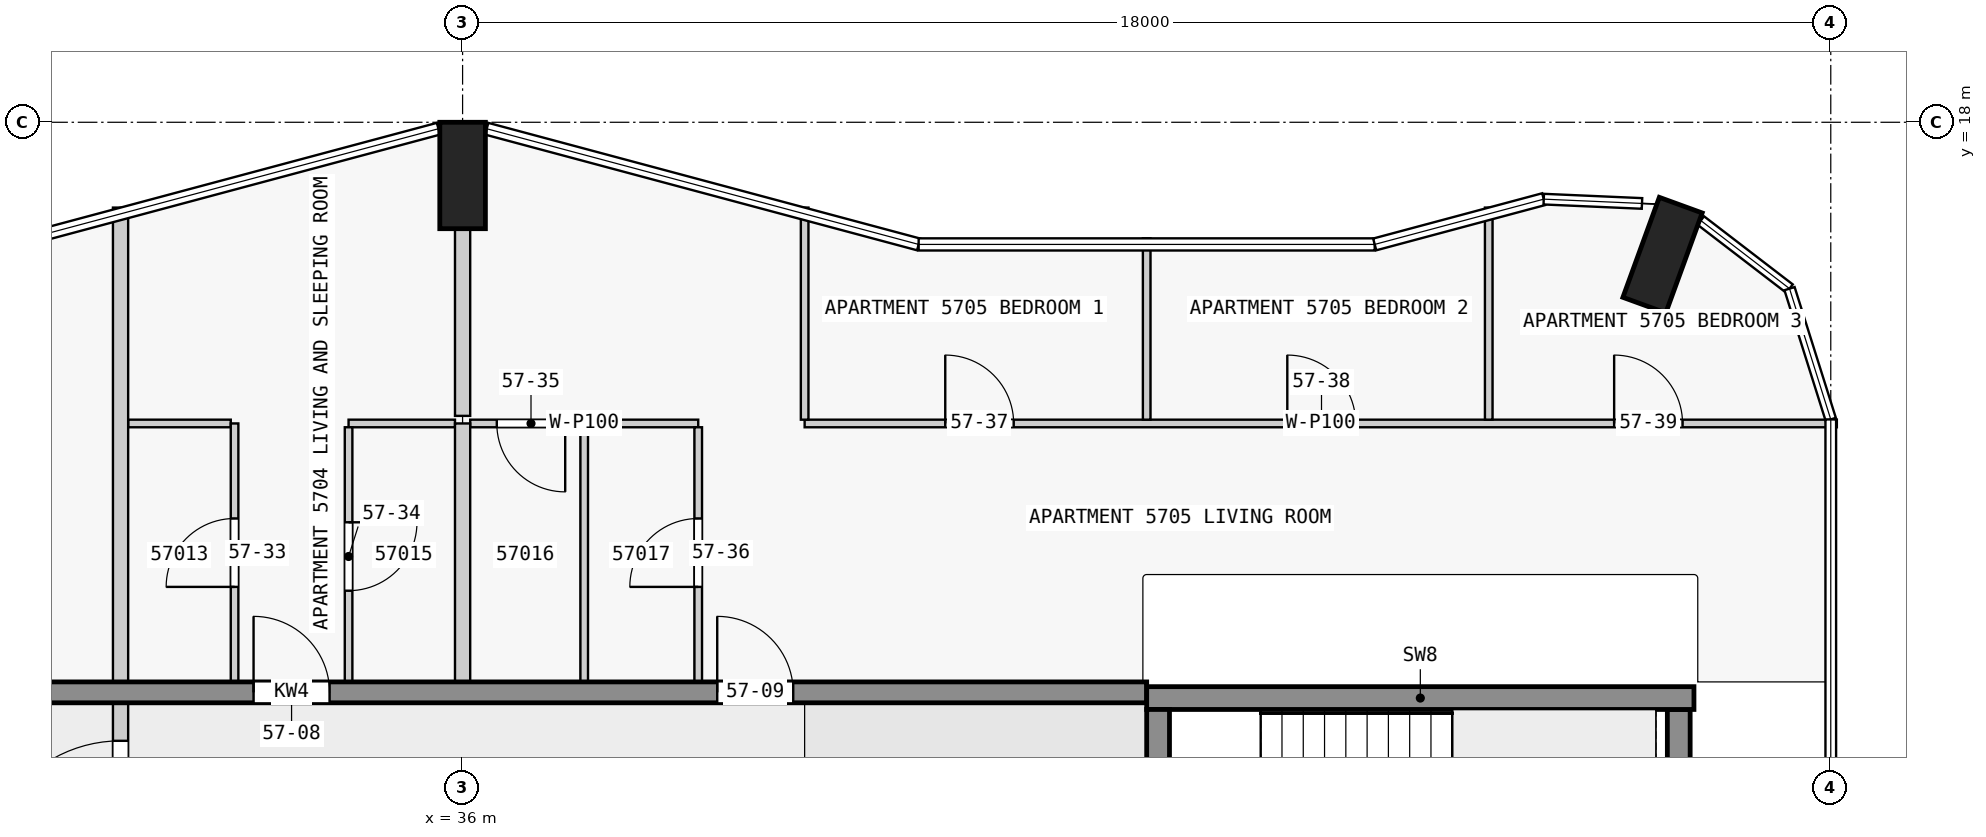
"""IFC4 building model, lengths in metres.
Left out: names, types, materials, properties, quantities, classifications, styles, units other than length and angle.
Written with IfcOpenShell. Run it as: python <this file> out.ifc"""

import sys

from ifc_helpers import new_model, si_unit, direction, frame, frame_2d, origin, origin_2d, place, context, subcontext, project, spatial, rectangle, extrude, element, fill, save


model = new_model("IFC4")
c1 = context("Model", 3, precision=1e-05, world=origin(), true_north=direction((0.0, 1.0)))
c2 = subcontext(c1, "Body", "Model", "MODEL_VIEW")
j1 = project(units=[si_unit("LENGTHUNIT", "METRE"), si_unit("PLANEANGLEUNIT", "RADIAN")], contexts=[c1])
p1 = place(None, origin())
s1 = spatial("IfcSite", under=j1, at=p1, CompositionType="ELEMENT")
p2 = place(p1, origin())
s2 = spatial("IfcBuilding", under=s1, at=p2, CompositionType="ELEMENT")
p3 = place(p2, frame((0.0, 0.0, 218.9)))
s3 = spatial("IfcBuildingStorey", under=s2, at=p3, CompositionType="ELEMENT", Elevation=218.9)
for number, where, z_axis, x_axis in (
    (1, (51.787, 16.252, 0.0), (0.0, 0.0, 1.0), (-0.94, 0.342, 0.0)),
    (2, (36.0, 17.3, 0.0), (0.0, 0.0, 1.0), (1.0, 0.0, 0.0)),
):
    element("IfcColumn", number, at=place(p3, frame(where, z_axis=z_axis, x_axis=x_axis)), inside=s3, PredefinedType="COLUMN", context=c2, shape_type="SweptSolid", body=[
        extrude(rectangle(XDim=0.6, YDim=1.4, at=origin_2d()), origin(), (0.0, 0.0, 1.0), 3.5),
    ])
p4 = place(p3, frame((45.15, 7.725, 0.0), z_axis=(0.0, 0.0, 1.0), x_axis=(0.0, 1.0, 0.0)))
e3 = element("IfcWall", 3, at=p4, inside=s3, PredefinedType="SHEAR", context=c2, shape_type="SweptSolid", body=[
    extrude(rectangle(XDim=2.55, YDim=0.3, at=frame_2d((1.275, 0.0))), origin(), (0.0, 0.0, 1.0), 3.5),
])
p5 = place(p4, frame((0.725, 0.0, 0.0)))
e4 = element("IfcOpeningElement", 4, at=p5, cuts=e3, PredefinedType="OPENING", context=c2, shape_type="SweptSolid", body=[
    extrude(rectangle(XDim=1.1, YDim=2.1, at=frame_2d((0.55, 1.05))), frame((0.0, 0.16, 0.0), z_axis=(0.0, -1.0, 0.0), x_axis=(1.0, 0.0, 0.0)), (0.0, 0.0, 1.0), 0.32),
])
p6 = place(p3, frame((52.0, 7.725, 0.0), z_axis=(0.0, 0.0, 1.0), x_axis=(0.0, 1.0, 0.0)))
e5 = element("IfcWall", 5, at=p6, inside=s3, PredefinedType="SHEAR", context=c2, shape_type="SweptSolid", body=[
    extrude(rectangle(XDim=2.55, YDim=0.3, at=frame_2d((1.275, 0.0))), origin(), (0.0, 0.0, 1.0), 3.5),
])
p7 = place(p3, frame((45.0, 10.425, 0.0), z_axis=(0.0, 0.0, 1.0), x_axis=(1.0, 0.0, 0.0)))
e6 = element("IfcWall", 6, at=p7, inside=s3, PredefinedType="SHEAR", context=c2, shape_type="SweptSolid", body=[
    extrude(rectangle(XDim=7.2, YDim=0.3, at=frame_2d((3.6, 0.0))), origin(), (0.0, 0.0, 1.0), 3.5),
])
p8 = place(p3, frame((22.5, 10.5, 0.0), z_axis=(0.0, 0.0, 1.0), x_axis=(1.0, 0.0, 0.0)))
e7 = element("IfcWall", 7, at=p8, inside=s3, PredefinedType="SHEAR", context=c2, shape_type="SweptSolid", body=[
    extrude(rectangle(XDim=22.5, YDim=0.275, at=frame_2d((11.25, 0.0))), origin(), (0.0, 0.0, 1.0), 3.25),
])
p9 = place(p8, frame((1.75, 0.0, 0.0)))
e8 = element("IfcOpeningElement", 8, at=p9, cuts=e7, PredefinedType="OPENING", context=c2, shape_type="SweptSolid", body=[
    extrude(rectangle(XDim=1.0, YDim=2.1, at=frame_2d((0.5, 1.05))), frame((0.0, 0.147, 0.0), z_axis=(0.0, -1.0, 0.0), x_axis=(1.0, 0.0, 0.0)), (0.0, 0.0, 1.0), 0.295),
])
p10 = place(p8, frame((5.85, 0.0, 0.0)))
e9 = element("IfcOpeningElement", 9, at=p10, cuts=e7, PredefinedType="OPENING", context=c2, shape_type="SweptSolid", body=[
    extrude(rectangle(XDim=1.8, YDim=2.1, at=frame_2d((0.9, 1.05))), frame((0.0, 0.147, 0.0), z_axis=(0.0, -1.0, 0.0), x_axis=(1.0, 0.0, 0.0)), (0.0, 0.0, 1.0), 0.295),
])
p11 = place(p8, frame((10.75, 0.0, 0.0)))
e10 = element("IfcOpeningElement", 10, at=p11, cuts=e7, PredefinedType="OPENING", context=c2, shape_type="SweptSolid", body=[
    extrude(rectangle(XDim=1.0, YDim=2.1, at=frame_2d((0.5, 1.05))), frame((0.0, 0.147, 0.0), z_axis=(0.0, -1.0, 0.0), x_axis=(1.0, 0.0, 0.0)), (0.0, 0.0, 1.0), 0.295),
])
p12 = place(p8, frame((16.85, 0.0, 0.0)))
e11 = element("IfcOpeningElement", 11, at=p12, cuts=e7, PredefinedType="OPENING", context=c2, shape_type="SweptSolid", body=[
    extrude(rectangle(XDim=1.0, YDim=2.1, at=frame_2d((0.5, 1.05))), frame((0.0, 0.147, 0.0), z_axis=(0.0, -1.0, 0.0), x_axis=(1.0, 0.0, 0.0)), (0.0, 0.0, 1.0), 0.295),
])
p13 = place(p3, frame((32.95, 14.038, 0.0), z_axis=(0.0, 0.0, 1.0), x_axis=(-1.0, 0.0, 0.0)))
e12 = element("IfcWall", 12, at=p13, inside=s3, PredefinedType="PARTITIONING", context=c2, shape_type="SweptSolid", body=[
    extrude(rectangle(XDim=1.35, YDim=0.1, at=frame_2d((0.675, 0.0))), origin(), (0.0, 0.0, 1.0), 3.25),
])
p14 = place(p3, frame((35.9, 14.038, 0.0), z_axis=(0.0, 0.0, 1.0), x_axis=(-1.0, 0.0, 0.0)))
e13 = element("IfcWall", 13, at=p14, inside=s3, PredefinedType="PARTITIONING", context=c2, shape_type="SweptSolid", body=[
    extrude(rectangle(XDim=1.4, YDim=0.1, at=frame_2d((0.7, 0.0))), origin(), (0.0, 0.0, 1.0), 3.25),
])
p15 = place(p3, frame((39.1, 14.038, 0.0), z_axis=(0.0, 0.0, 1.0), x_axis=(-1.0, 0.0, 0.0)))
e14 = element("IfcWall", 14, at=p15, inside=s3, PredefinedType="PARTITIONING", context=c2, shape_type="SweptSolid", body=[
    extrude(rectangle(XDim=3.0, YDim=0.1, at=frame_2d((1.5, 0.0))), origin(), (0.0, 0.0, 1.0), 3.25),
])
p16 = place(p15, frame((1.75, 0.0, 0.0)))
e15 = element("IfcOpeningElement", 15, at=p16, cuts=e14, PredefinedType="OPENING", context=c2, shape_type="SweptSolid", body=[
    extrude(rectangle(XDim=0.9, YDim=2.1, at=frame_2d((0.45, 1.05))), frame((0.0, 0.06, 0.0), z_axis=(0.0, -1.0, 0.0), x_axis=(1.0, 0.0, 0.0)), (0.0, 0.0, 1.0), 0.12),
])
p17 = place(p3, frame((40.5, 14.038, 0.0), z_axis=(0.0, 0.0, 1.0), x_axis=(1.0, 0.0, 0.0)))
e16 = element("IfcWall", 16, at=p17, inside=s3, PredefinedType="PARTITIONING", context=c2, shape_type="SweptSolid", body=[
    extrude(rectangle(XDim=13.58, YDim=0.1, at=frame_2d((6.79, 0.0))), origin(), (0.0, 0.0, 1.0), 3.25),
])
p18 = place(p17, frame((1.85, 0.0, 0.0)))
e17 = element("IfcOpeningElement", 17, at=p18, cuts=e16, PredefinedType="OPENING", context=c2, shape_type="SweptSolid", body=[
    extrude(rectangle(XDim=0.9, YDim=2.1, at=frame_2d((0.45, 1.05))), frame((0.0, 0.06, 0.0), z_axis=(0.0, -1.0, 0.0), x_axis=(1.0, 0.0, 0.0)), (0.0, 0.0, 1.0), 0.12),
])
p19 = place(p17, frame((6.35, 0.0, 0.0)))
e18 = element("IfcOpeningElement", 18, at=p19, cuts=e16, PredefinedType="OPENING", context=c2, shape_type="SweptSolid", body=[
    extrude(rectangle(XDim=0.9, YDim=2.1, at=frame_2d((0.45, 1.05))), frame((0.0, 0.06, 0.0), z_axis=(0.0, -1.0, 0.0), x_axis=(1.0, 0.0, 0.0)), (0.0, 0.0, 1.0), 0.12),
])
p20 = place(p17, frame((10.65, 0.0, 0.0)))
e19 = element("IfcOpeningElement", 19, at=p20, cuts=e16, PredefinedType="OPENING", context=c2, shape_type="SweptSolid", body=[
    extrude(rectangle(XDim=0.9, YDim=2.1, at=frame_2d((0.45, 1.05))), frame((0.0, 0.06, 0.0), z_axis=(0.0, -1.0, 0.0), x_axis=(1.0, 0.0, 0.0)), (0.0, 0.0, 1.0), 0.12),
])
p21 = place(p3, frame((31.5, 10.637, 0.0), z_axis=(0.0, 0.0, 1.0), x_axis=(0.0, 1.0, 0.0)))
e20 = element("IfcWall", 20, at=p21, inside=s3, PredefinedType="PARTITIONING", context=c2, shape_type="SweptSolid", body=[
    extrude(rectangle(XDim=6.24, YDim=0.2, at=frame_2d((3.12, 0.0))), origin(), (0.0, 0.0, 1.0), 3.25),
])
p22 = place(p3, frame((33.0, 10.637, 0.0), z_axis=(0.0, 0.0, 1.0), x_axis=(0.0, 1.0, 0.0)))
e21 = element("IfcWall", 21, at=p22, inside=s3, PredefinedType="PARTITIONING", context=c2, shape_type="SweptSolid", body=[
    extrude(rectangle(XDim=3.4, YDim=0.1, at=frame_2d((1.7, 0.0))), origin(), (0.0, 0.0, 1.0), 3.25),
])
p23 = place(p22, frame((1.25, 0.0, 0.0)))
e22 = element("IfcOpeningElement", 22, at=p23, cuts=e21, PredefinedType="OPENING", context=c2, shape_type="SweptSolid", body=[
    extrude(rectangle(XDim=0.9, YDim=2.1, at=frame_2d((0.45, 1.05))), frame((0.0, 0.06, 0.0), z_axis=(0.0, -1.0, 0.0), x_axis=(1.0, 0.0, 0.0)), (0.0, 0.0, 1.0), 0.12),
])
p24 = place(p3, frame((34.5, 13.988, 0.0), z_axis=(0.0, 0.0, 1.0), x_axis=(0.0, -1.0, 0.0)))
e23 = element("IfcWall", 23, at=p24, inside=s3, PredefinedType="PARTITIONING", context=c2, shape_type="SweptSolid", body=[
    extrude(rectangle(XDim=3.35, YDim=0.1, at=frame_2d((1.675, 0.0))), origin(), (0.0, 0.0, 1.0), 3.25),
])
p25 = place(p24, frame((1.25, 0.0, 0.0)))
e24 = element("IfcOpeningElement", 24, at=p25, cuts=e23, PredefinedType="OPENING", context=c2, shape_type="SweptSolid", body=[
    extrude(rectangle(XDim=0.9, YDim=2.1, at=frame_2d((0.45, 1.05))), frame((0.0, 0.06, 0.0), z_axis=(0.0, -1.0, 0.0), x_axis=(1.0, 0.0, 0.0)), (0.0, 0.0, 1.0), 0.12),
])
p26 = place(p3, frame((36.0, 16.6, 0.0), z_axis=(0.0, 0.0, 1.0), x_axis=(0.0, -1.0, 0.0)))
e25 = element("IfcWall", 25, at=p26, inside=s3, PredefinedType="PARTITIONING", context=c2, shape_type="SweptSolid", body=[
    extrude(rectangle(XDim=2.463, YDim=0.2, at=frame_2d((1.231, 0.0))), origin(), (0.0, 0.0, 1.0), 3.25),
])
p27 = place(p3, frame((36.0, 10.637, 0.0), z_axis=(0.0, 0.0, 1.0), x_axis=(0.0, 1.0, 0.0)))
e26 = element("IfcWall", 26, at=p27, inside=s3, PredefinedType="PARTITIONING", context=c2, shape_type="SweptSolid", body=[
    extrude(rectangle(XDim=3.4, YDim=0.2, at=frame_2d((1.7, 0.0))), origin(), (0.0, 0.0, 1.0), 3.25),
])
p28 = place(p3, frame((37.6, 10.637, 0.0), z_axis=(0.0, 0.0, 1.0), x_axis=(0.0, 1.0, 0.0)))
e27 = element("IfcWall", 27, at=p28, inside=s3, PredefinedType="PARTITIONING", context=c2, shape_type="SweptSolid", body=[
    extrude(rectangle(XDim=3.35, YDim=0.1, at=frame_2d((1.675, 0.0))), origin(), (0.0, 0.0, 1.0), 3.25),
])
p29 = place(p3, frame((39.1, 10.637, 0.0), z_axis=(0.0, 0.0, 1.0), x_axis=(0.0, 1.0, 0.0)))
e28 = element("IfcWall", 28, at=p29, inside=s3, PredefinedType="PARTITIONING", context=c2, shape_type="SweptSolid", body=[
    extrude(rectangle(XDim=3.35, YDim=0.1, at=frame_2d((1.675, 0.0))), origin(), (0.0, 0.0, 1.0), 3.25),
])
p30 = place(p29, frame((1.25, 0.0, 0.0)))
e29 = element("IfcOpeningElement", 29, at=p30, cuts=e28, PredefinedType="OPENING", context=c2, shape_type="SweptSolid", body=[
    extrude(rectangle(XDim=0.9, YDim=2.1, at=frame_2d((0.45, 1.05))), frame((0.0, 0.06, 0.0), z_axis=(0.0, -1.0, 0.0), x_axis=(1.0, 0.0, 0.0)), (0.0, 0.0, 1.0), 0.12),
])
p31 = place(p3, frame((40.5, 16.878, 0.0), z_axis=(0.0, 0.0, 1.0), x_axis=(0.0, -1.0, 0.0)))
e30 = element("IfcWall", 30, at=p31, inside=s3, PredefinedType="PARTITIONING", context=c2, shape_type="SweptSolid", body=[
    extrude(rectangle(XDim=2.79, YDim=0.1, at=frame_2d((1.395, 0.0))), origin(), (0.0, 0.0, 1.0), 3.25),
])
p32 = place(p3, frame((45.0, 14.087, 0.0), z_axis=(0.0, 0.0, 1.0), x_axis=(0.0, 1.0, 0.0)))
e31 = element("IfcWall", 31, at=p32, inside=s3, PredefinedType="PARTITIONING", context=c2, shape_type="SweptSolid", body=[
    extrude(rectangle(XDim=2.386, YDim=0.1, at=frame_2d((1.193, 0.0))), origin(), (0.0, 0.0, 1.0), 3.25),
])
p33 = place(p3, frame((49.5, 14.087, 0.0), z_axis=(0.0, 0.0, 1.0), x_axis=(0.0, 1.0, 0.0)))
e32 = element("IfcWall", 32, at=p33, inside=s3, PredefinedType="PARTITIONING", context=c2, shape_type="SweptSolid", body=[
    extrude(rectangle(XDim=2.79, YDim=0.1, at=frame_2d((1.395, 0.0))), origin(), (0.0, 0.0, 1.0), 3.25),
])
p34 = place(p3, frame((31.5, 7.462, 0.0), z_axis=(0.0, 0.0, 1.0), x_axis=(0.0, 1.0, 0.0)))
e33 = element("IfcWall", 33, at=p34, inside=s3, PredefinedType="PARTITIONING", context=c2, shape_type="SweptSolid", body=[
    extrude(rectangle(XDim=3.075, YDim=0.2, at=frame_2d((1.538, 0.0))), origin(), (0.0, 0.0, 1.0), 3.25),
])
p35 = place(p34, frame((0.6, 0.0, 0.0)))
e34 = element("IfcOpeningElement", 34, at=p35, cuts=e33, PredefinedType="OPENING", context=c2, shape_type="SweptSolid", body=[
    extrude(rectangle(XDim=1.8, YDim=2.1, at=frame_2d((0.9, 1.05))), frame((0.0, 0.11, 0.0), z_axis=(0.0, -1.0, 0.0), x_axis=(1.0, 0.0, 0.0)), (0.0, 0.0, 1.0), 0.22),
])
p36 = place(p11, origin())
e35 = element("IfcDoor", 35, at=p36, inside=s3, OperationType="SINGLE_SWING_LEFT", PredefinedType="DOOR", context=c2, shape_type="SweptSolid", body=[
    extrude(rectangle(XDim=1.0, YDim=2.1, at=frame_2d((0.5, 1.05))), frame((0.0, 0.025, 0.0), z_axis=(0.0, -1.0, 0.0), x_axis=(1.0, 0.0, 0.0)), (0.0, 0.0, 1.0), 0.05),
])
fill(e10, e35)
p37 = place(p12, origin())
e36 = element("IfcDoor", 36, at=p37, inside=s3, OperationType="SINGLE_SWING_RIGHT", PredefinedType="DOOR", context=c2, shape_type="SweptSolid", body=[
    extrude(rectangle(XDim=1.0, YDim=2.1, at=frame_2d((0.5, 1.05))), frame((0.0, 0.025, 0.0), z_axis=(0.0, -1.0, 0.0), x_axis=(1.0, 0.0, 0.0)), (0.0, 0.0, 1.0), 0.05),
])
fill(e11, e36)
p38 = place(p35, origin())
e37 = element("IfcDoor", 37, at=p38, inside=s3, OperationType="SINGLE_SWING_LEFT", PredefinedType="DOOR", context=c2, shape_type="SweptSolid", body=[
    extrude(rectangle(XDim=1.8, YDim=2.1, at=frame_2d((0.9, 1.05))), frame((0.0, 0.025, 0.0), z_axis=(0.0, -1.0, 0.0), x_axis=(1.0, 0.0, 0.0)), (0.0, 0.0, 1.0), 0.05),
])
fill(e34, e37)
p39 = place(p23, origin())
e38 = element("IfcDoor", 38, at=p39, inside=s3, OperationType="SINGLE_SWING_LEFT", PredefinedType="DOOR", context=c2, shape_type="SweptSolid", body=[
    extrude(rectangle(XDim=0.9, YDim=2.1, at=frame_2d((0.45, 1.05))), frame((0.0, 0.025, 0.0), z_axis=(0.0, -1.0, 0.0), x_axis=(1.0, 0.0, 0.0)), (0.0, 0.0, 1.0), 0.05),
])
fill(e22, e38)
p40 = place(p25, origin())
e39 = element("IfcDoor", 39, at=p40, inside=s3, OperationType="SINGLE_SWING_RIGHT", PredefinedType="DOOR", context=c2, shape_type="SweptSolid", body=[
    extrude(rectangle(XDim=0.9, YDim=2.1, at=frame_2d((0.45, 1.05))), frame((0.0, 0.025, 0.0), z_axis=(0.0, -1.0, 0.0), x_axis=(1.0, 0.0, 0.0)), (0.0, 0.0, 1.0), 0.05),
])
fill(e24, e39)
p41 = place(p16, origin())
e40 = element("IfcDoor", 40, at=p41, inside=s3, OperationType="SINGLE_SWING_RIGHT", PredefinedType="DOOR", context=c2, shape_type="SweptSolid", body=[
    extrude(rectangle(XDim=0.9, YDim=2.1, at=frame_2d((0.45, 1.05))), frame((0.0, 0.025, 0.0), z_axis=(0.0, -1.0, 0.0), x_axis=(1.0, 0.0, 0.0)), (0.0, 0.0, 1.0), 0.05),
])
fill(e15, e40)
p42 = place(p30, origin())
e41 = element("IfcDoor", 41, at=p42, inside=s3, OperationType="SINGLE_SWING_RIGHT", PredefinedType="DOOR", context=c2, shape_type="SweptSolid", body=[
    extrude(rectangle(XDim=0.9, YDim=2.1, at=frame_2d((0.45, 1.05))), frame((0.0, 0.025, 0.0), z_axis=(0.0, -1.0, 0.0), x_axis=(1.0, 0.0, 0.0)), (0.0, 0.0, 1.0), 0.05),
])
fill(e29, e41)
p43 = place(p18, origin())
e42 = element("IfcDoor", 42, at=p43, inside=s3, OperationType="SINGLE_SWING_LEFT", PredefinedType="DOOR", context=c2, shape_type="SweptSolid", body=[
    extrude(rectangle(XDim=0.9, YDim=2.1, at=frame_2d((0.45, 1.05))), frame((0.0, 0.025, 0.0), z_axis=(0.0, -1.0, 0.0), x_axis=(1.0, 0.0, 0.0)), (0.0, 0.0, 1.0), 0.05),
])
fill(e17, e42)
p44 = place(p19, origin())
e43 = element("IfcDoor", 43, at=p44, inside=s3, OperationType="SINGLE_SWING_RIGHT", PredefinedType="DOOR", context=c2, shape_type="SweptSolid", body=[
    extrude(rectangle(XDim=0.9, YDim=2.1, at=frame_2d((0.45, 1.05))), frame((0.0, 0.025, 0.0), z_axis=(0.0, -1.0, 0.0), x_axis=(1.0, 0.0, 0.0)), (0.0, 0.0, 1.0), 0.05),
])
fill(e18, e43)
p45 = place(p20, origin())
e44 = element("IfcDoor", 44, at=p45, inside=s3, OperationType="SINGLE_SWING_RIGHT", PredefinedType="DOOR", context=c2, shape_type="SweptSolid", body=[
    extrude(rectangle(XDim=0.9, YDim=2.1, at=frame_2d((0.45, 1.05))), frame((0.0, 0.025, 0.0), z_axis=(0.0, -1.0, 0.0), x_axis=(1.0, 0.0, 0.0)), (0.0, 0.0, 1.0), 0.05),
])
fill(e19, e44)
save(model, sys.argv[1])
